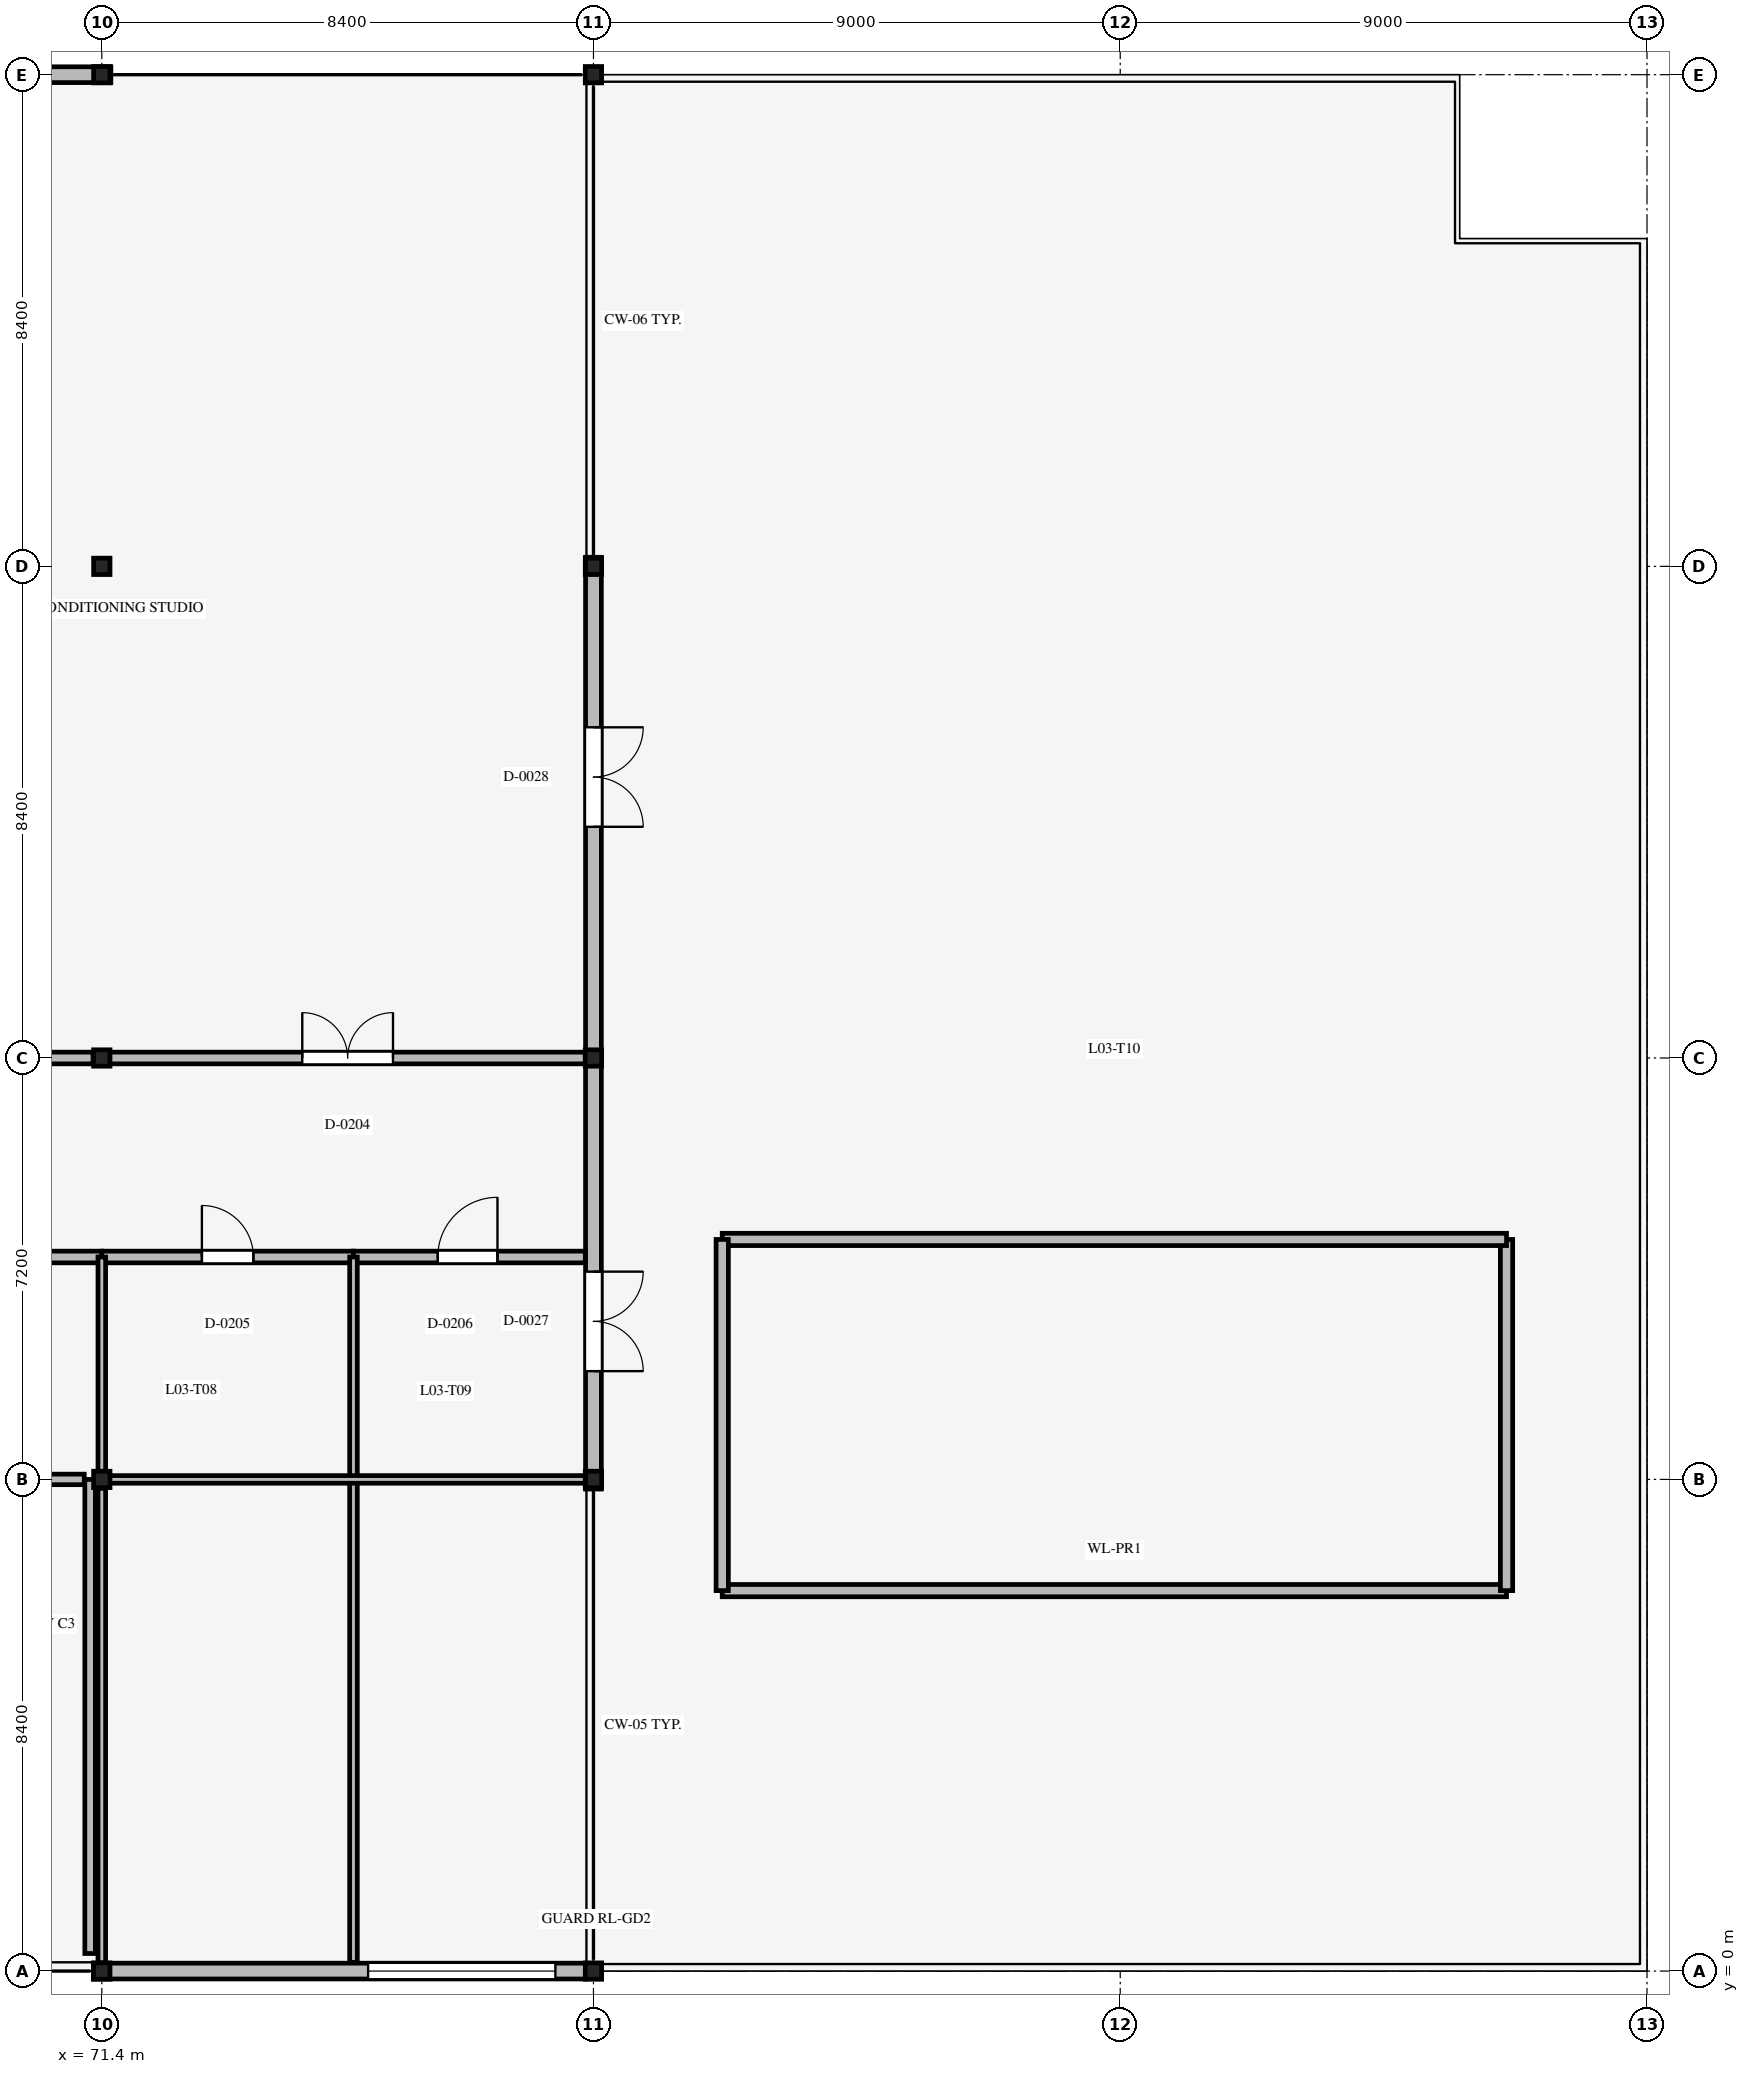
"""IFC4 building model, lengths in metres.
Left out: names, types, materials, properties, quantities, classifications, styles, units other than length and angle.
Written with IfcOpenShell. Run it as: python <this file> out.ifc"""

import sys

from ifc_helpers import new_model, si_unit, direction, frame, frame_2d, origin, origin_2d, place, context, subcontext, project, spatial, rectangle, i_section, extrude, element, fill, save


model = new_model("IFC4")
c1 = context("Model", 3, precision=1e-05, world=origin(), true_north=direction((0.0, 1.0)))
c2 = subcontext(c1, "Body", "Model", "MODEL_VIEW")
j1 = project(units=[si_unit("LENGTHUNIT", "METRE"), si_unit("PLANEANGLEUNIT", "RADIAN")], contexts=[c1])
p1 = place(None, origin())
s1 = spatial("IfcSite", under=j1, at=p1, CompositionType="ELEMENT")
p2 = place(p1, origin())
s2 = spatial("IfcBuilding", under=s1, at=p2, CompositionType="ELEMENT")
p3 = place(p2, frame((0.0, 0.0, 15.9)))
s3 = spatial("IfcBuildingStorey", under=s2, at=p3, CompositionType="ELEMENT", Elevation=15.9)
for number, where, z_axis, x_axis in (
    (1, (71.4, 0.0, 0.0), (0.0, 0.0, 1.0), (1.0, 0.0, 0.0)),
    (2, (71.4, 8.4, 0.0), (0.0, 0.0, 1.0), (1.0, 0.0, 0.0)),
    (3, (71.4, 15.6, 0.0), (0.0, 0.0, 1.0), (1.0, 0.0, 0.0)),
    (4, (71.4, 24.0, 0.0), (0.0, 0.0, 1.0), (1.0, 0.0, 0.0)),
    (5, (71.4, 32.4, 0.0), (0.0, 0.0, 1.0), (1.0, 0.0, 0.0)),
    (6, (79.8, 0.0, 0.0), (0.0, 0.0, 1.0), (1.0, 0.0, 0.0)),
    (7, (79.8, 8.4, 0.0), (0.0, 0.0, 1.0), (1.0, 0.0, 0.0)),
    (8, (79.8, 15.6, 0.0), (0.0, 0.0, 1.0), (1.0, 0.0, 0.0)),
    (9, (79.8, 24.0, 0.0), (0.0, 0.0, 1.0), (1.0, 0.0, 0.0)),
    (10, (79.8, 32.4, 0.0), (0.0, 0.0, 1.0), (1.0, 0.0, 0.0)),
):
    element("IfcColumn", number, at=place(p3, frame(where, z_axis=z_axis, x_axis=x_axis)), inside=s3, PredefinedType="COLUMN", context=c2, shape_type="SweptSolid", body=[
        extrude(i_section(OverallWidth=0.28, OverallDepth=0.28, WebThickness=0.01, FlangeThickness=0.018, FilletRadius=0.024, at=origin_2d()), origin(), (0.0, 0.0, 1.0), 3.9),
    ])
p4 = place(p3, frame((79.67, 0.0, 0.0), z_axis=(0.0, 0.0, 1.0), x_axis=(-1.0, 0.0, 0.0)))
e11 = element("IfcWall", 11, at=p4, inside=s3, PredefinedType="STANDARD", context=c2, shape_type="SweptSolid", body=[
    extrude(rectangle(XDim=8.415, YDim=0.27, at=frame_2d((4.208, 0.0))), origin(), (0.0, 0.0, 1.0), 3.64),
])
p5 = place(p4, frame((0.52, 0.0, 0.9)))
e12 = element("IfcOpeningElement", 12, at=p5, cuts=e11, PredefinedType="OPENING", context=c2, shape_type="SweptSolid", body=[
    extrude(rectangle(XDim=3.2, YDim=2.1, at=frame_2d((1.6, 1.05))), frame((0.0, 0.145, 0.0), z_axis=(0.0, -1.0, 0.0), x_axis=(1.0, 0.0, 0.0)), (0.0, 0.0, 1.0), 0.29),
])
p6 = place(p3, frame((63.265, 32.4, 0.0), z_axis=(0.0, 0.0, 1.0), x_axis=(1.0, 0.0, 0.0)))
e13 = element("IfcWall", 13, at=p6, inside=s3, PredefinedType="STANDARD", context=c2, shape_type="SweptSolid", body=[
    extrude(rectangle(XDim=8.29, YDim=0.27, at=frame_2d((4.145, 0.0))), origin(), (0.0, 0.0, 1.0), 3.64),
])
p7 = place(p6, frame((2.685, 0.0, 0.95)))
e14 = element("IfcOpeningElement", 14, at=p7, cuts=e13, PredefinedType="OPENING", context=c2, shape_type="SweptSolid", body=[
    extrude(rectangle(XDim=2.2, YDim=1.9, at=frame_2d((1.1, 0.95))), frame((0.0, 0.145, 0.0), z_axis=(0.0, -1.0, 0.0), x_axis=(1.0, 0.0, 0.0)), (0.0, 0.0, 1.0), 0.29),
])
p8 = place(p3, frame((79.8, 15.725, 0.0), z_axis=(0.0, 0.0, 1.0), x_axis=(0.0, -1.0, 0.0)))
e15 = element("IfcWall", 15, at=p8, inside=s3, PredefinedType="STANDARD", context=c2, shape_type="SweptSolid", body=[
    extrude(rectangle(XDim=7.49, YDim=0.27, at=frame_2d((3.745, 0.0))), origin(), (0.0, 0.0, 1.0), 3.64),
])
p9 = place(p8, frame((3.775, 0.0, 0.0)))
e16 = element("IfcOpeningElement", 16, at=p9, cuts=e15, PredefinedType="OPENING", context=c2, shape_type="SweptSolid", body=[
    extrude(rectangle(XDim=1.7, YDim=2.3, at=frame_2d((0.85, 1.15))), frame((0.0, 0.145, 0.0), z_axis=(0.0, -1.0, 0.0), x_axis=(1.0, 0.0, 0.0)), (0.0, 0.0, 1.0), 0.29),
])
p10 = place(p3, frame((79.8, 24.155, 0.0), z_axis=(0.0, 0.0, 1.0), x_axis=(0.0, -1.0, 0.0)))
e17 = element("IfcWall", 17, at=p10, inside=s3, PredefinedType="STANDARD", context=c2, shape_type="SweptSolid", body=[
    extrude(rectangle(XDim=8.425, YDim=0.27, at=frame_2d((4.212, 0.0))), origin(), (0.0, 0.0, 1.0), 3.64),
])
p11 = place(p10, frame((2.905, 0.0, 0.0)))
e18 = element("IfcOpeningElement", 18, at=p11, cuts=e17, PredefinedType="OPENING", context=c2, shape_type="SweptSolid", body=[
    extrude(rectangle(XDim=1.7, YDim=2.3, at=frame_2d((0.85, 1.15))), frame((0.0, 0.145, 0.0), z_axis=(0.0, -1.0, 0.0), x_axis=(1.0, 0.0, 0.0)), (0.0, 0.0, 1.0), 0.29),
])
p12 = place(p3, frame((82.0, 6.5, 0.0), z_axis=(0.0, 0.0, 1.0), x_axis=(1.0, 0.0, 0.0)))
e19 = element("IfcWall", 19, at=p12, inside=s3, PredefinedType="PARAPET", context=c2, shape_type="SweptSolid", body=[
    extrude(rectangle(XDim=13.4, YDim=0.21, at=frame_2d((6.7, 0.0))), origin(), (0.0, 0.0, 1.0), 0.55),
])
p13 = place(p3, frame((95.4, 6.5, 0.0), z_axis=(0.0, 0.0, 1.0), x_axis=(0.0, 1.0, 0.0)))
e20 = element("IfcWall", 20, at=p13, inside=s3, PredefinedType="PARAPET", context=c2, shape_type="SweptSolid", body=[
    extrude(rectangle(XDim=6.0, YDim=0.21, at=frame_2d((3.0, 0.0))), origin(), (0.0, 0.0, 1.0), 0.55),
])
p14 = place(p3, frame((95.4, 12.5, 0.0), z_axis=(0.0, 0.0, 1.0), x_axis=(-1.0, 0.0, 0.0)))
e21 = element("IfcWall", 21, at=p14, inside=s3, PredefinedType="PARAPET", context=c2, shape_type="SweptSolid", body=[
    extrude(rectangle(XDim=13.4, YDim=0.21, at=frame_2d((6.7, 0.0))), origin(), (0.0, 0.0, 1.0), 0.55),
])
p15 = place(p3, frame((82.0, 12.5, 0.0), z_axis=(0.0, 0.0, 1.0), x_axis=(0.0, -1.0, 0.0)))
e22 = element("IfcWall", 22, at=p15, inside=s3, PredefinedType="PARAPET", context=c2, shape_type="SweptSolid", body=[
    extrude(rectangle(XDim=6.0, YDim=0.21, at=frame_2d((3.0, 0.0))), origin(), (0.0, 0.0, 1.0), 0.55),
])
p16 = place(p3, frame((63.285, 15.6, 0.0), z_axis=(0.0, 0.0, 1.0), x_axis=(1.0, 0.0, 0.0)))
e23 = element("IfcWall", 23, at=p16, inside=s3, PredefinedType="STANDARD", context=c2, shape_type="SweptSolid", body=[
    extrude(rectangle(XDim=7.965, YDim=0.2, at=frame_2d((3.982, 0.0))), origin(), (0.0, 0.0, 1.0), 2.9),
])
p17 = place(p16, frame((3.14, 0.0, 0.0)))
e24 = element("IfcOpeningElement", 24, at=p17, cuts=e23, PredefinedType="OPENING", context=c2, shape_type="SweptSolid", body=[
    extrude(rectangle(XDim=1.55, YDim=2.25, at=frame_2d((0.775, 1.125))), frame((0.0, 0.11, 0.0), z_axis=(0.0, -1.0, 0.0), x_axis=(1.0, 0.0, 0.0)), (0.0, 0.0, 1.0), 0.22),
])
p18 = place(p3, frame((63.0, 12.2, 0.0), z_axis=(0.0, 0.0, 1.0), x_axis=(1.0, 0.0, 0.0)))
e25 = element("IfcWall", 25, at=p18, inside=s3, PredefinedType="STANDARD", context=c2, shape_type="SweptSolid", body=[
    extrude(rectangle(XDim=8.4, YDim=0.2, at=frame_2d((4.2, 0.0))), origin(), (0.0, 0.0, 1.0), 2.9),
])
p19 = place(p18, frame((3.69, 0.0, 0.0)))
e26 = element("IfcOpeningElement", 26, at=p19, cuts=e25, PredefinedType="OPENING", context=c2, shape_type="SweptSolid", body=[
    extrude(rectangle(XDim=1.02, YDim=2.15, at=frame_2d((0.51, 1.075))), frame((0.0, 0.11, 0.0), z_axis=(0.0, -1.0, 0.0), x_axis=(1.0, 0.0, 0.0)), (0.0, 0.0, 1.0), 0.22),
])
p20 = place(p3, frame((71.255, 15.6, 0.0), z_axis=(0.0, 0.0, 1.0), x_axis=(1.0, 0.0, 0.0)))
e27 = element("IfcWall", 27, at=p20, inside=s3, PredefinedType="STANDARD", context=c2, shape_type="SweptSolid", body=[
    extrude(rectangle(XDim=8.405, YDim=0.2, at=frame_2d((4.203, 0.0))), origin(), (0.0, 0.0, 1.0), 2.9),
])
p21 = place(p20, frame((3.57, 0.0, 0.0)))
e28 = element("IfcOpeningElement", 28, at=p21, cuts=e27, PredefinedType="OPENING", context=c2, shape_type="SweptSolid", body=[
    extrude(rectangle(XDim=1.55, YDim=2.25, at=frame_2d((0.775, 1.125))), frame((0.0, 0.11, 0.0), z_axis=(0.0, -1.0, 0.0), x_axis=(1.0, 0.0, 0.0)), (0.0, 0.0, 1.0), 0.22),
])
p22 = place(p3, frame((71.4, 12.2, 0.0), z_axis=(0.0, 0.0, 1.0), x_axis=(1.0, 0.0, 0.0)))
e29 = element("IfcWall", 29, at=p22, inside=s3, PredefinedType="STANDARD", context=c2, shape_type="SweptSolid", body=[
    extrude(rectangle(XDim=4.3, YDim=0.2, at=frame_2d((2.15, 0.0))), origin(), (0.0, 0.0, 1.0), 2.9),
])
p23 = place(p22, frame((1.71, 0.0, 0.0)))
e30 = element("IfcOpeningElement", 30, at=p23, cuts=e29, PredefinedType="OPENING", context=c2, shape_type="SweptSolid", body=[
    extrude(rectangle(XDim=0.88, YDim=2.1, at=frame_2d((0.44, 1.05))), frame((0.0, 0.11, 0.0), z_axis=(0.0, -1.0, 0.0), x_axis=(1.0, 0.0, 0.0)), (0.0, 0.0, 1.0), 0.22),
])
p24 = place(p3, frame((75.7, 12.2, 0.0), z_axis=(0.0, 0.0, 1.0), x_axis=(1.0, 0.0, 0.0)))
e31 = element("IfcWall", 31, at=p24, inside=s3, PredefinedType="STANDARD", context=c2, shape_type="SweptSolid", body=[
    extrude(rectangle(XDim=3.96, YDim=0.2, at=frame_2d((1.98, 0.0))), origin(), (0.0, 0.0, 1.0), 2.9),
])
p25 = place(p24, frame((1.44, 0.0, 0.0)))
e32 = element("IfcOpeningElement", 32, at=p25, cuts=e31, PredefinedType="OPENING", context=c2, shape_type="SweptSolid", body=[
    extrude(rectangle(XDim=1.02, YDim=2.15, at=frame_2d((0.51, 1.075))), frame((0.0, 0.11, 0.0), z_axis=(0.0, -1.0, 0.0), x_axis=(1.0, 0.0, 0.0)), (0.0, 0.0, 1.0), 0.22),
])
p26 = place(p3, frame((71.4, 0.14, 0.0), z_axis=(0.0, 0.0, 1.0), x_axis=(0.0, 1.0, 0.0)))
e33 = element("IfcWall", 33, at=p26, inside=s3, PredefinedType="STANDARD", context=c2, shape_type="SweptSolid", body=[
    extrude(rectangle(XDim=8.11, YDim=0.13, at=frame_2d((4.055, 0.0))), origin(), (0.0, 0.0, 1.0), 2.9),
])
p27 = place(p3, frame((71.4, 8.255, 0.0), z_axis=(0.0, 0.0, 1.0), x_axis=(0.0, 1.0, 0.0)))
e34 = element("IfcWall", 34, at=p27, inside=s3, PredefinedType="STANDARD", context=c2, shape_type="SweptSolid", body=[
    extrude(rectangle(XDim=3.945, YDim=0.13, at=frame_2d((1.973, 0.0))), origin(), (0.0, 0.0, 1.0), 2.9),
])
p28 = place(p3, frame((75.7, 0.15, 0.0), z_axis=(0.0, 0.0, 1.0), x_axis=(0.0, 1.0, 0.0)))
e35 = element("IfcWall", 35, at=p28, inside=s3, PredefinedType="STANDARD", context=c2, shape_type="SweptSolid", body=[
    extrude(rectangle(XDim=12.05, YDim=0.13, at=frame_2d((6.025, 0.0))), origin(), (0.0, 0.0, 1.0), 2.9),
])
p29 = place(p3, frame((71.47, 8.4, 0.0), z_axis=(0.0, 0.0, 1.0), x_axis=(1.0, 0.0, 0.0)))
e36 = element("IfcWall", 36, at=p29, inside=s3, PredefinedType="STANDARD", context=c2, shape_type="SweptSolid", body=[
    extrude(rectangle(XDim=8.19, YDim=0.13, at=frame_2d((4.095, 0.0))), origin(), (0.0, 0.0, 1.0), 2.9),
])
p30 = place(p3, frame((67.0, 8.4, 0.0), z_axis=(0.0, 0.0, 1.0), x_axis=(1.0, 0.0, 0.0)))
e37 = element("IfcWall", 37, at=p30, inside=s3, PredefinedType="STANDARD", context=c2, shape_type="SweptSolid", body=[
    extrude(rectangle(XDim=4.1, YDim=0.18, at=frame_2d((2.05, 0.0))), origin(), (0.0, 0.0, 1.0), 2.9),
])
p31 = place(p30, frame((1.19, 0.0, 0.0)))
e38 = element("IfcOpeningElement", 38, at=p31, cuts=e37, PredefinedType="OPENING", context=c2, shape_type="SweptSolid", body=[
    extrude(rectangle(XDim=1.02, YDim=2.15, at=frame_2d((0.51, 1.075))), frame((0.0, 0.1, 0.0), z_axis=(0.0, -1.0, 0.0), x_axis=(1.0, 0.0, 0.0)), (0.0, 0.0, 1.0), 0.2),
])
p32 = place(p3, frame((71.2, 0.3, 0.0), z_axis=(0.0, 0.0, 1.0), x_axis=(0.0, 1.0, 0.0)))
e39 = element("IfcWall", 39, at=p32, inside=s3, PredefinedType="STANDARD", context=c2, shape_type="SweptSolid", body=[
    extrude(rectangle(XDim=8.1, YDim=0.18, at=frame_2d((4.05, 0.0))), origin(), (0.0, 0.0, 1.0), 2.9),
])
p33 = place(p5, origin())
e40 = element("IfcWindow", 40, at=p33, inside=s3, PartitioningType="SINGLE_PANEL", PredefinedType="WINDOW", context=c2, shape_type="SweptSolid", body=[
    extrude(rectangle(XDim=3.2, YDim=2.1, at=frame_2d((1.6, 1.05))), frame((0.0, 0.03, 0.0), z_axis=(0.0, -1.0, 0.0), x_axis=(1.0, 0.0, 0.0)), (0.0, 0.0, 1.0), 0.06),
])
fill(e12, e40)
p34 = place(p9, origin())
e41 = element("IfcDoor", 41, at=p34, inside=s3, OperationType="DOUBLE_DOOR_SINGLE_SWING", PredefinedType="DOOR", context=c2, shape_type="SweptSolid", body=[
    extrude(rectangle(XDim=1.7, YDim=2.3, at=frame_2d((0.85, 1.15))), frame((0.0, 0.025, 0.0), z_axis=(0.0, -1.0, 0.0), x_axis=(1.0, 0.0, 0.0)), (0.0, 0.0, 1.0), 0.05),
])
fill(e16, e41)
p35 = place(p11, origin())
e42 = element("IfcDoor", 42, at=p35, inside=s3, OperationType="DOUBLE_DOOR_SINGLE_SWING", PredefinedType="DOOR", context=c2, shape_type="SweptSolid", body=[
    extrude(rectangle(XDim=1.7, YDim=2.3, at=frame_2d((0.85, 1.15))), frame((0.0, 0.025, 0.0), z_axis=(0.0, -1.0, 0.0), x_axis=(1.0, 0.0, 0.0)), (0.0, 0.0, 1.0), 0.05),
])
fill(e18, e42)
p36 = place(p21, origin())
e43 = element("IfcDoor", 43, at=p36, inside=s3, OperationType="DOUBLE_DOOR_SINGLE_SWING", PredefinedType="DOOR", context=c2, shape_type="SweptSolid", body=[
    extrude(rectangle(XDim=1.55, YDim=2.25, at=frame_2d((0.775, 1.125))), frame((0.0, 0.025, 0.0), z_axis=(0.0, -1.0, 0.0), x_axis=(1.0, 0.0, 0.0)), (0.0, 0.0, 1.0), 0.05),
])
fill(e28, e43)
p37 = place(p23, origin())
e44 = element("IfcDoor", 44, at=p37, inside=s3, OperationType="SINGLE_SWING_LEFT", PredefinedType="DOOR", context=c2, shape_type="SweptSolid", body=[
    extrude(rectangle(XDim=0.88, YDim=2.1, at=frame_2d((0.44, 1.05))), frame((0.0, 0.025, 0.0), z_axis=(0.0, -1.0, 0.0), x_axis=(1.0, 0.0, 0.0)), (0.0, 0.0, 1.0), 0.05),
])
fill(e30, e44)
p38 = place(p25, origin())
e45 = element("IfcDoor", 45, at=p38, inside=s3, OperationType="SINGLE_SWING_RIGHT", PredefinedType="DOOR", context=c2, shape_type="SweptSolid", body=[
    extrude(rectangle(XDim=1.02, YDim=2.15, at=frame_2d((0.51, 1.075))), frame((0.0, 0.025, 0.0), z_axis=(0.0, -1.0, 0.0), x_axis=(1.0, 0.0, 0.0)), (0.0, 0.0, 1.0), 0.05),
])
fill(e32, e45)
save(model, sys.argv[1])
